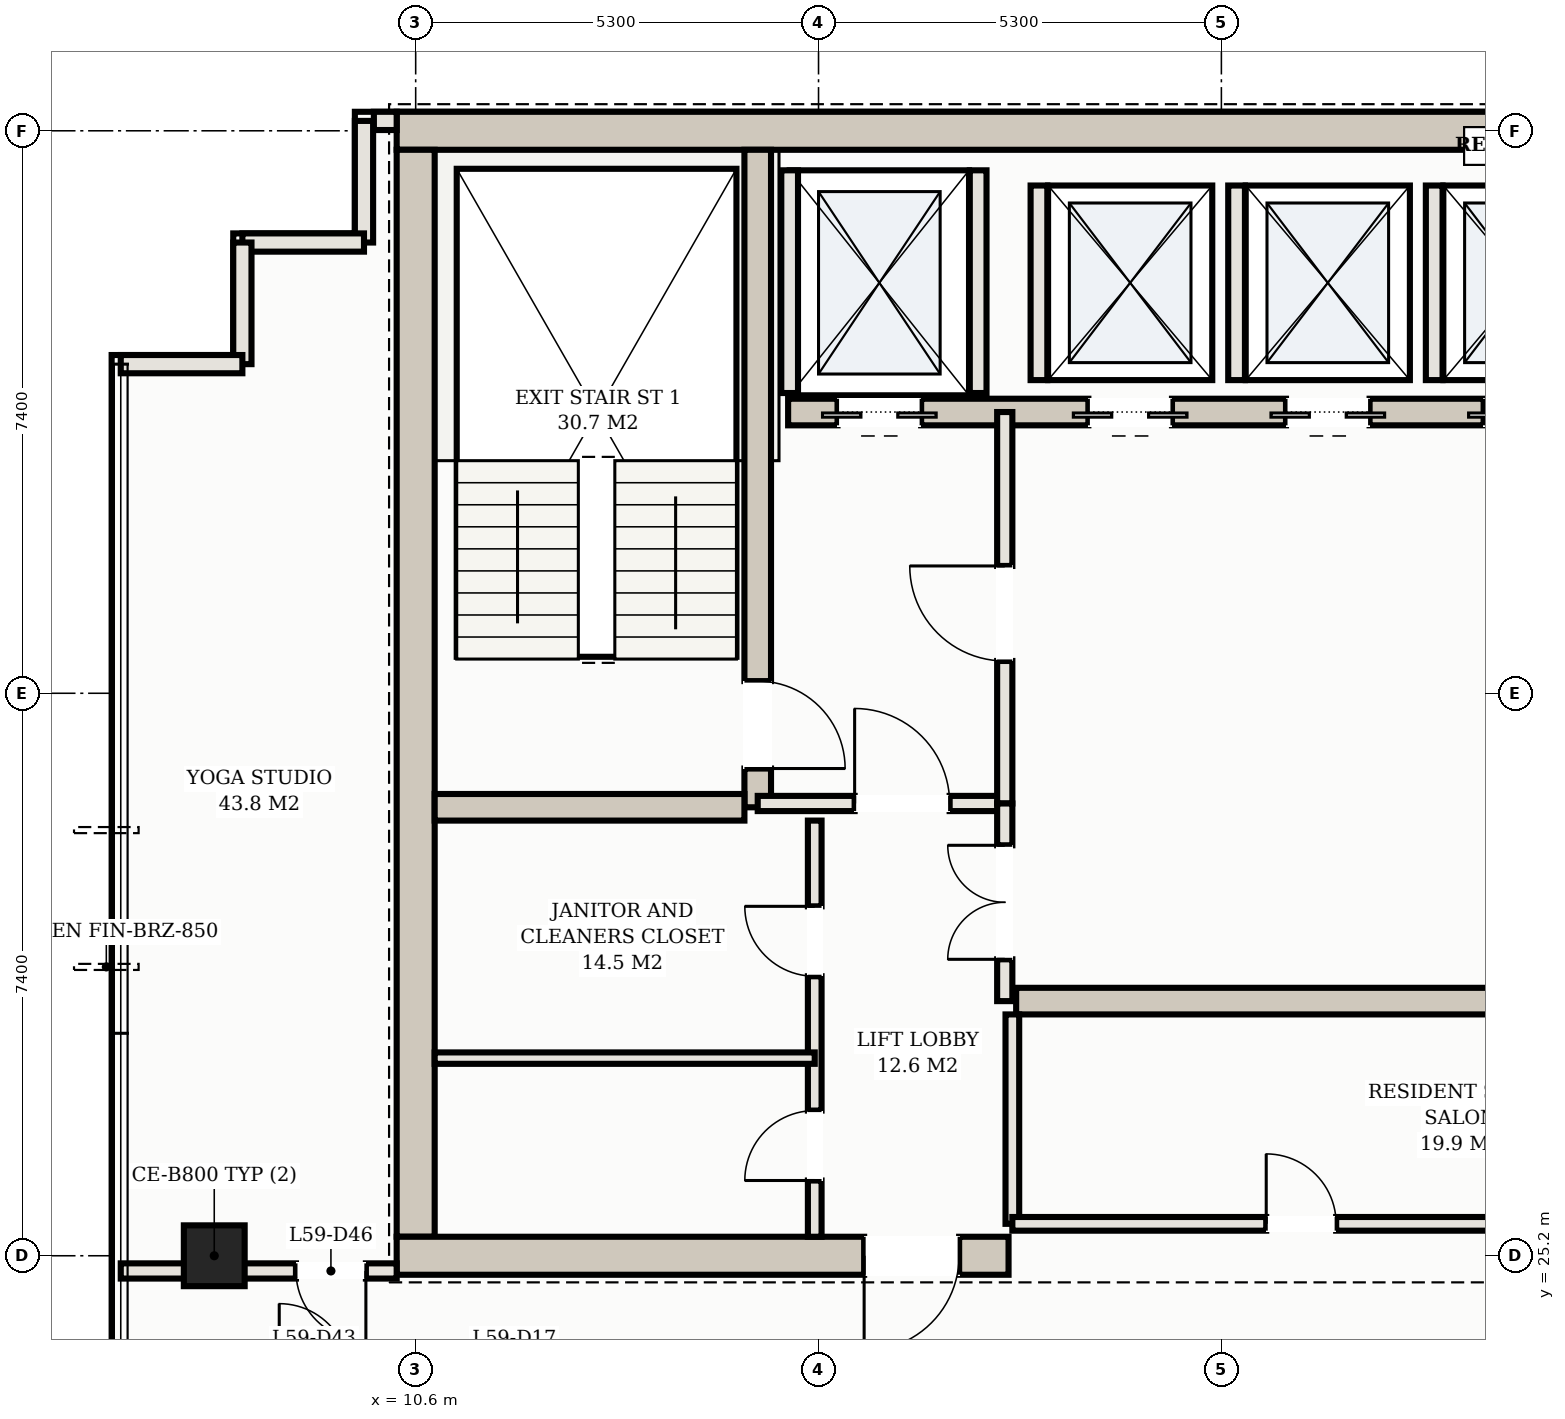
"""IFC4 building model, lengths in metres.
Left out: names, types, materials, properties, quantities, classifications, styles, units other than length and angle.
Written with IfcOpenShell. Run it as: python <this file> out.ifc"""

import sys

from ifc_helpers import new_model, si_unit, direction, frame, frame_2d, origin, origin_2d, place, context, subcontext, project, spatial, rectangle, hollow_rectangle, extrude, element, fill, save


model = new_model("IFC4")
c1 = context("Model", 3, precision=1e-05, world=origin(), true_north=direction((0.0, 1.0)))
c2 = subcontext(c1, "Body", "Model", "MODEL_VIEW")
j1 = project(units=[si_unit("LENGTHUNIT", "METRE"), si_unit("PLANEANGLEUNIT", "RADIAN")], contexts=[c1])
p1 = place(None, origin())
s1 = spatial("IfcSite", under=j1, at=p1, CompositionType="ELEMENT")
p2 = place(p1, origin())
s2 = spatial("IfcBuilding", under=s1, at=p2, CompositionType="ELEMENT")
p3 = place(p2, frame((0.0, 0.0, 216.5)))
s3 = spatial("IfcBuildingStorey", under=s2, at=p3, CompositionType="ELEMENT", Elevation=216.5)
p4 = place(p3, frame((10.35, 40.0, 0.0), z_axis=(0.0, 0.0, 1.0), x_axis=(1.0, 0.0, 0.0)))
e1 = element("IfcWall", 1, at=p4, inside=s3, PredefinedType="SHEAR", context=c2, shape_type="SweptSolid", body=[
    extrude(rectangle(XDim=32.3, YDim=0.5, at=frame_2d((16.15, 0.0))), origin(), (0.0, 0.0, 1.0), 3.11),
])
p5 = place(p3, frame((10.6, 25.45, 0.0), z_axis=(0.0, 0.0, 1.0), x_axis=(0.0, 1.0, 0.0)))
e2 = element("IfcWall", 2, at=p5, inside=s3, PredefinedType="SHEAR", context=c2, shape_type="SweptSolid", body=[
    extrude(rectangle(XDim=14.3, YDim=0.5, at=frame_2d((7.15, 0.0))), origin(), (0.0, 0.0, 1.0), 3.11),
])
p6 = place(p3, frame((10.35, 25.2, 0.0), z_axis=(0.0, 0.0, 1.0), x_axis=(1.0, 0.0, 0.0)))
e3 = element("IfcWall", 3, at=p6, inside=s3, PredefinedType="SHEAR", context=c2, shape_type="SweptSolid", body=[
    extrude(rectangle(XDim=8.05, YDim=0.5, at=frame_2d((4.025, 0.0))), origin(), (0.0, 0.0, 1.0), 3.11),
])
p7 = place(p6, frame((6.15, 0.0, 0.0)))
e4 = element("IfcOpeningElement", 4, at=p7, cuts=e3, PredefinedType="OPENING", context=c2, shape_type="SweptSolid", body=[
    extrude(rectangle(XDim=1.25, YDim=2.2, at=frame_2d((0.625, 1.1))), frame((0.0, 0.26, 0.0), z_axis=(0.0, -1.0, 0.0), x_axis=(1.0, 0.0, 0.0)), (0.0, 0.0, 1.0), 0.52),
])
p8 = place(p3, frame((15.1, 31.1, 0.0), z_axis=(0.0, 0.0, 1.0), x_axis=(0.0, 1.0, 0.0)))
e5 = element("IfcWall", 5, at=p8, inside=s3, PredefinedType="SHEAR", context=c2, shape_type="SweptSolid", body=[
    extrude(rectangle(XDim=8.65, YDim=0.35, at=frame_2d((4.325, 0.0))), origin(), (0.0, 0.0, 1.0), 3.11),
])
p9 = place(p8, frame((0.51, 0.0, 0.0)))
e6 = element("IfcOpeningElement", 6, at=p9, cuts=e5, PredefinedType="OPENING", context=c2, shape_type="SweptSolid", body=[
    extrude(rectangle(XDim=1.15, YDim=2.2, at=frame_2d((0.575, 1.1))), frame((0.0, 0.185, 0.0), z_axis=(0.0, -1.0, 0.0), x_axis=(1.0, 0.0, 0.0)), (0.0, 0.0, 1.0), 0.37),
])
p10 = place(p3, frame((10.85, 31.1, 0.0), z_axis=(0.0, 0.0, 1.0), x_axis=(1.0, 0.0, 0.0)))
e7 = element("IfcWall", 7, at=p10, inside=s3, PredefinedType="SHEAR", context=c2, shape_type="SweptSolid", body=[
    extrude(rectangle(XDim=4.075, YDim=0.35, at=frame_2d((2.038, 0.0))), origin(), (0.0, 0.0, 1.0), 3.11),
])
p11 = place(p3, frame((15.5, 36.3, 0.0), z_axis=(0.0, 0.0, 1.0), x_axis=(1.0, 0.0, 0.0)))
e8 = element("IfcWall", 8, at=p11, inside=s3, PredefinedType="SHEAR", context=c2, shape_type="SweptSolid", body=[
    extrude(rectangle(XDim=22.0, YDim=0.35, at=frame_2d((11.0, 0.0))), origin(), (0.0, 0.0, 1.0), 3.11),
])
p12 = place(p11, frame((0.65, 0.0, 0.0)))
e9 = element("IfcOpeningElement", 9, at=p12, cuts=e8, PredefinedType="OPENING", context=c2, shape_type="SweptSolid", body=[
    extrude(rectangle(XDim=1.1, YDim=2.15, at=frame_2d((0.55, 1.075))), frame((0.0, 0.185, 0.0), z_axis=(0.0, -1.0, 0.0), x_axis=(1.0, 0.0, 0.0)), (0.0, 0.0, 1.0), 0.37),
])
p13 = place(p11, frame((20.25, 0.0, 0.0)))
e10 = element("IfcOpeningElement", 10, at=p13, cuts=e8, PredefinedType="OPENING", context=c2, shape_type="SweptSolid", body=[
    extrude(rectangle(XDim=1.1, YDim=2.15, at=frame_2d((0.55, 1.075))), frame((0.0, 0.185, 0.0), z_axis=(0.0, -1.0, 0.0), x_axis=(1.0, 0.0, 0.0)), (0.0, 0.0, 1.0), 0.37),
])
p14 = place(p11, frame((17.05, 0.0, 0.0)))
e11 = element("IfcOpeningElement", 11, at=p14, cuts=e8, PredefinedType="OPENING", context=c2, shape_type="SweptSolid", body=[
    extrude(rectangle(XDim=1.3, YDim=2.2, at=frame_2d((0.65, 1.1))), frame((0.0, 0.185, 0.0), z_axis=(0.0, -1.0, 0.0), x_axis=(1.0, 0.0, 0.0)), (0.0, 0.0, 1.0), 0.37),
])
p15 = place(p11, frame((3.95, 0.0, 0.0)))
e12 = element("IfcOpeningElement", 12, at=p15, cuts=e8, PredefinedType="OPENING", context=c2, shape_type="SweptSolid", body=[
    extrude(rectangle(XDim=1.1, YDim=2.15, at=frame_2d((0.55, 1.075))), frame((0.0, 0.185, 0.0), z_axis=(0.0, -1.0, 0.0), x_axis=(1.0, 0.0, 0.0)), (0.0, 0.0, 1.0), 0.37),
])
p16 = place(p11, frame((6.55, 0.0, 0.0)))
e13 = element("IfcOpeningElement", 13, at=p16, cuts=e8, PredefinedType="OPENING", context=c2, shape_type="SweptSolid", body=[
    extrude(rectangle(XDim=1.1, YDim=2.15, at=frame_2d((0.55, 1.075))), frame((0.0, 0.185, 0.0), z_axis=(0.0, -1.0, 0.0), x_axis=(1.0, 0.0, 0.0)), (0.0, 0.0, 1.0), 0.37),
])
p17 = place(p11, frame((9.15, 0.0, 0.0)))
e14 = element("IfcOpeningElement", 14, at=p17, cuts=e8, PredefinedType="OPENING", context=c2, shape_type="SweptSolid", body=[
    extrude(rectangle(XDim=1.1, YDim=2.15, at=frame_2d((0.55, 1.075))), frame((0.0, 0.185, 0.0), z_axis=(0.0, -1.0, 0.0), x_axis=(1.0, 0.0, 0.0)), (0.0, 0.0, 1.0), 0.37),
])
p18 = place(p3, frame((18.5, 28.55, 0.0), z_axis=(0.0, 0.0, 1.0), x_axis=(1.0, 0.0, 0.0)))
e15 = element("IfcWall", 15, at=p18, inside=s3, PredefinedType="SHEAR", context=c2, shape_type="SweptSolid", body=[
    extrude(rectangle(XDim=16.0, YDim=0.35, at=frame_2d((8.0, 0.0))), origin(), (0.0, 0.0, 1.0), 3.11),
])
p19 = place(p3, frame((7.95, 25.2, 0.0), z_axis=(0.0, 0.0, 1.0), x_axis=(1.0, 0.0, 0.0)))
e16 = element("IfcColumn", 16, at=p19, inside=s3, PredefinedType="COLUMN", context=c2, shape_type="SweptSolid", body=[
    extrude(hollow_rectangle(XDim=0.8, YDim=0.8, WallThickness=0.028, at=origin_2d()), origin(), (0.0, 0.0, 1.0), 3.3),
])
for number, where, z_axis, x_axis in (
    (17, (15.52, 36.55, 0.0), (0.0, 0.0, 1.0), (0.0, 1.0, 0.0)),
    (18, (18.0, 36.55, 0.0), (0.0, 0.0, 1.0), (0.0, 1.0, 0.0)),
):
    element("IfcWall", number, at=place(p3, frame(where, z_axis=z_axis, x_axis=x_axis)), inside=s3, PredefinedType="SOLIDWALL", context=c2, shape_type="SweptSolid", body=[
        extrude(rectangle(XDim=2.93, YDim=0.22, at=frame_2d((1.465, 0.0))), origin(), (0.0, 0.0, 1.0), 3.11),
    ])
for number, where, z_axis, x_axis in (
    (19, (18.8, 36.72, 0.0), (0.0, 0.0, 1.0), (0.0, 1.0, 0.0)),
    (20, (21.4, 36.72, 0.0), (0.0, 0.0, 1.0), (0.0, 1.0, 0.0)),
    (21, (24.0, 36.72, 0.0), (0.0, 0.0, 1.0), (0.0, 1.0, 0.0)),
):
    element("IfcWall", number, at=place(p3, frame(where, z_axis=z_axis, x_axis=x_axis)), inside=s3, PredefinedType="SOLIDWALL", context=c2, shape_type="SweptSolid", body=[
        extrude(rectangle(XDim=2.56, YDim=0.22, at=frame_2d((1.28, 0.0))), origin(), (0.0, 0.0, 1.0), 3.11),
    ])
p20 = place(p3, frame((10.35, 40.13, 0.0), z_axis=(0.0, 0.0, 1.0), x_axis=(-1.0, 0.0, 0.0)))
e22 = element("IfcWall", 22, at=p20, inside=s3, PredefinedType="SOLIDWALL", context=c2, shape_type="SweptSolid", body=[
    extrude(rectangle(XDim=0.3, YDim=0.24, at=frame_2d((0.15, 0.0))), origin(), (0.0, 0.0, 1.0), 3.11),
])
for number, where, z_axis, x_axis in (
    (23, (9.92, 40.13, 0.0), (0.0, 0.0, 1.0), (0.0, -1.0, 0.0)),
    (24, (9.92, 38.53, 0.0), (0.0, 0.0, 1.0), (-1.0, 0.0, 0.0)),
):
    element("IfcWall", number, at=place(p3, frame(where, z_axis=z_axis, x_axis=x_axis)), inside=s3, PredefinedType="SOLIDWALL", context=c2, shape_type="SweptSolid", body=[
        extrude(rectangle(XDim=1.6, YDim=0.24, at=frame_2d((0.8, 0.0))), origin(), (0.0, 0.0, 1.0), 3.11),
    ])
for number, where, z_axis, x_axis in (
    (25, (8.32, 38.53, 0.0), (0.0, 0.0, 1.0), (0.0, -1.0, 0.0)),
    (26, (8.32, 36.93, 0.0), (0.0, 0.0, 1.0), (-1.0, 0.0, 0.0)),
):
    element("IfcWall", number, at=place(p3, frame(where, z_axis=z_axis, x_axis=x_axis)), inside=s3, PredefinedType="SOLIDWALL", context=c2, shape_type="SweptSolid", body=[
        extrude(rectangle(XDim=1.6, YDim=0.24, at=frame_2d((0.8, 0.0))), origin(), (0.0, 0.0, 1.0), 3.11),
    ])
p21 = place(p3, frame((15.1, 31.15, 0.0), z_axis=(0.0, 0.0, 1.0), x_axis=(1.0, 0.0, 0.0)))
e27 = element("IfcWall", 27, at=p21, inside=s3, PredefinedType="PARTITIONING", context=c2, shape_type="SweptSolid", body=[
    extrude(rectangle(XDim=3.25, YDim=0.2, at=frame_2d((1.625, 0.0))), origin(), (0.0, 0.0, 1.0), 2.43),
])
p22 = place(p21, frame((1.275, 0.0, 0.0)))
e28 = element("IfcOpeningElement", 28, at=p22, cuts=e27, PredefinedType="OPENING", context=c2, shape_type="SweptSolid", body=[
    extrude(rectangle(XDim=1.25, YDim=2.2, at=frame_2d((0.625, 1.1))), frame((0.0, 0.11, 0.0), z_axis=(0.0, -1.0, 0.0), x_axis=(1.0, 0.0, 0.0)), (0.0, 0.0, 1.0), 0.22),
])
p23 = place(p3, frame((18.35, 31.15, 0.0), z_axis=(0.0, 0.0, 1.0), x_axis=(0.0, 1.0, 0.0)))
e29 = element("IfcWall", 29, at=p23, inside=s3, PredefinedType="PARTITIONING", context=c2, shape_type="SweptSolid", body=[
    extrude(rectangle(XDim=5.15, YDim=0.2, at=frame_2d((2.575, 0.0))), origin(), (0.0, 0.0, 1.0), 2.43),
])
p24 = place(p23, frame((1.875, 0.0, 0.0)))
e30 = element("IfcOpeningElement", 30, at=p24, cuts=e29, PredefinedType="OPENING", context=c2, shape_type="SweptSolid", body=[
    extrude(rectangle(XDim=1.25, YDim=2.2, at=frame_2d((0.625, 1.1))), frame((0.0, 0.11, 0.0), z_axis=(0.0, -1.0, 0.0), x_axis=(1.0, 0.0, 0.0)), (0.0, 0.0, 1.0), 0.22),
])
p25 = place(p3, frame((15.85, 25.45, 0.0), z_axis=(0.0, 0.0, 1.0), x_axis=(0.0, 1.0, 0.0)))
e31 = element("IfcWall", 31, at=p25, inside=s3, PredefinedType="PARTITIONING", context=c2, shape_type="SweptSolid", body=[
    extrude(rectangle(XDim=5.475, YDim=0.18, at=frame_2d((2.738, 0.0))), origin(), (0.0, 0.0, 1.0), 2.43),
])
p26 = place(p25, frame((0.74, 0.0, 0.0)))
e32 = element("IfcOpeningElement", 32, at=p26, cuts=e31, PredefinedType="OPENING", context=c2, shape_type="SweptSolid", body=[
    extrude(rectangle(XDim=0.92, YDim=2.15, at=frame_2d((0.46, 1.075))), frame((0.0, 0.1, 0.0), z_axis=(0.0, -1.0, 0.0), x_axis=(1.0, 0.0, 0.0)), (0.0, 0.0, 1.0), 0.2),
])
p27 = place(p25, frame((3.427, 0.0, 0.0)))
e33 = element("IfcOpeningElement", 33, at=p27, cuts=e31, PredefinedType="OPENING", context=c2, shape_type="SweptSolid", body=[
    extrude(rectangle(XDim=0.92, YDim=2.15, at=frame_2d((0.46, 1.075))), frame((0.0, 0.1, 0.0), z_axis=(0.0, -1.0, 0.0), x_axis=(1.0, 0.0, 0.0)), (0.0, 0.0, 1.0), 0.2),
])
p28 = place(p3, frame((10.85, 27.8, 0.0), z_axis=(0.0, 0.0, 1.0), x_axis=(1.0, 0.0, 0.0)))
e34 = element("IfcWall", 34, at=p28, inside=s3, PredefinedType="PARTITIONING", context=c2, shape_type="SweptSolid", body=[
    extrude(rectangle(XDim=5.0, YDim=0.15, at=frame_2d((2.5, 0.0))), origin(), (0.0, 0.0, 1.0), 2.43),
])
p29 = place(p3, frame((18.35, 28.55, 0.0), z_axis=(0.0, 0.0, 1.0), x_axis=(0.0, 1.0, 0.0)))
e35 = element("IfcWall", 35, at=p29, inside=s3, PredefinedType="PARTITIONING", context=c2, shape_type="SweptSolid", body=[
    extrude(rectangle(XDim=2.6, YDim=0.2, at=frame_2d((1.3, 0.0))), origin(), (0.0, 0.0, 1.0), 2.43),
])
p30 = place(p29, frame((0.55, 0.0, 0.0)))
e36 = element("IfcOpeningElement", 36, at=p30, cuts=e35, PredefinedType="OPENING", context=c2, shape_type="SweptSolid", body=[
    extrude(rectangle(XDim=1.5, YDim=2.25, at=frame_2d((0.75, 1.125))), frame((0.0, 0.11, 0.0), z_axis=(0.0, -1.0, 0.0), x_axis=(1.0, 0.0, 0.0)), (0.0, 0.0, 1.0), 0.22),
])
p31 = place(p3, frame((18.45, 25.62, 0.0), z_axis=(0.0, 0.0, 1.0), x_axis=(0.0, 1.0, 0.0)))
e37 = element("IfcWall", 37, at=p31, inside=s3, PredefinedType="PARTITIONING", context=c2, shape_type="SweptSolid", body=[
    extrude(rectangle(XDim=2.755, YDim=0.18, at=frame_2d((1.377, 0.0))), origin(), (0.0, 0.0, 1.0), 2.43),
])
p32 = place(p3, frame((18.45, 25.62, 0.0), z_axis=(0.0, 0.0, 1.0), x_axis=(1.0, 0.0, 0.0)))
e38 = element("IfcWall", 38, at=p32, inside=s3, PredefinedType="PARTITIONING", context=c2, shape_type="SweptSolid", body=[
    extrude(rectangle(XDim=7.9, YDim=0.18, at=frame_2d((3.95, 0.0))), origin(), (0.0, 0.0, 1.0), 2.43),
])
p33 = place(p32, frame((3.34, 0.0, 0.0)))
e39 = element("IfcOpeningElement", 39, at=p33, cuts=e38, PredefinedType="OPENING", context=c2, shape_type="SweptSolid", body=[
    extrude(rectangle(XDim=0.92, YDim=2.15, at=frame_2d((0.46, 1.075))), frame((0.0, 0.1, 0.0), z_axis=(0.0, -1.0, 0.0), x_axis=(1.0, 0.0, 0.0)), (0.0, 0.0, 1.0), 0.2),
])
p34 = place(p3, frame((6.72, 25.0, 0.0), z_axis=(0.0, 0.0, 1.0), x_axis=(1.0, 0.0, 0.0)))
e40 = element("IfcWall", 40, at=p34, inside=s3, PredefinedType="PARTITIONING", context=c2, shape_type="SweptSolid", body=[
    extrude(rectangle(XDim=3.63, YDim=0.2, at=frame_2d((1.815, 0.0))), origin(), (0.0, 0.0, 1.0), 2.43),
])
p35 = place(p34, frame((2.305, 0.0, 0.0)))
e41 = element("IfcOpeningElement", 41, at=p35, cuts=e40, PredefinedType="OPENING", context=c2, shape_type="SweptSolid", body=[
    extrude(rectangle(XDim=0.92, YDim=2.15, at=frame_2d((0.46, 1.075))), frame((0.0, 0.11, 0.0), z_axis=(0.0, -1.0, 0.0), x_axis=(1.0, 0.0, 0.0)), (0.0, 0.0, 1.0), 0.22),
])
p36 = place(p12, frame((1.1, 0.0, 0.0), z_axis=(0.0, 0.0, 1.0), x_axis=(-1.0, 0.0, 0.0)))
e42 = element("IfcDoor", 42, at=p36, inside=s3, OperationType="DOUBLE_DOOR_SLIDING", PredefinedType="DOOR", context=c2, shape_type="SweptSolid", body=[
    extrude(rectangle(XDim=1.1, YDim=2.15, at=frame_2d((0.55, 1.075))), frame((0.0, 0.025, 0.0), z_axis=(0.0, -1.0, 0.0), x_axis=(1.0, 0.0, 0.0)), (0.0, 0.0, 1.0), 0.05),
])
fill(e9, e42)
p37 = place(p15, frame((1.1, 0.0, 0.0), z_axis=(0.0, 0.0, 1.0), x_axis=(-1.0, 0.0, 0.0)))
e43 = element("IfcDoor", 43, at=p37, inside=s3, OperationType="DOUBLE_DOOR_SLIDING", PredefinedType="DOOR", context=c2, shape_type="SweptSolid", body=[
    extrude(rectangle(XDim=1.1, YDim=2.15, at=frame_2d((0.55, 1.075))), frame((0.0, 0.025, 0.0), z_axis=(0.0, -1.0, 0.0), x_axis=(1.0, 0.0, 0.0)), (0.0, 0.0, 1.0), 0.05),
])
fill(e12, e43)
p38 = place(p16, frame((1.1, 0.0, 0.0), z_axis=(0.0, 0.0, 1.0), x_axis=(-1.0, 0.0, 0.0)))
e44 = element("IfcDoor", 44, at=p38, inside=s3, OperationType="DOUBLE_DOOR_SLIDING", PredefinedType="DOOR", context=c2, shape_type="SweptSolid", body=[
    extrude(rectangle(XDim=1.1, YDim=2.15, at=frame_2d((0.55, 1.075))), frame((0.0, 0.025, 0.0), z_axis=(0.0, -1.0, 0.0), x_axis=(1.0, 0.0, 0.0)), (0.0, 0.0, 1.0), 0.05),
])
fill(e13, e44)
p39 = place(p17, frame((1.1, 0.0, 0.0), z_axis=(0.0, 0.0, 1.0), x_axis=(-1.0, 0.0, 0.0)))
e45 = element("IfcDoor", 45, at=p39, inside=s3, OperationType="DOUBLE_DOOR_SLIDING", PredefinedType="DOOR", context=c2, shape_type="SweptSolid", body=[
    extrude(rectangle(XDim=1.1, YDim=2.15, at=frame_2d((0.55, 1.075))), frame((0.0, 0.025, 0.0), z_axis=(0.0, -1.0, 0.0), x_axis=(1.0, 0.0, 0.0)), (0.0, 0.0, 1.0), 0.05),
])
fill(e14, e45)
p40 = place(p7, frame((1.25, 0.0, 0.0), z_axis=(0.0, 0.0, 1.0), x_axis=(-1.0, 0.0, 0.0)))
e46 = element("IfcDoor", 46, at=p40, inside=s3, OperationType="SINGLE_SWING_RIGHT", PredefinedType="DOOR", context=c2, shape_type="SweptSolid", body=[
    extrude(rectangle(XDim=1.25, YDim=2.2, at=frame_2d((0.625, 1.1))), frame((0.0, 0.025, 0.0), z_axis=(0.0, -1.0, 0.0), x_axis=(1.0, 0.0, 0.0)), (0.0, 0.0, 1.0), 0.05),
])
fill(e4, e46)
p41 = place(p22, origin())
e47 = element("IfcDoor", 47, at=p41, inside=s3, OperationType="SINGLE_SWING_LEFT", PredefinedType="DOOR", context=c2, shape_type="SweptSolid", body=[
    extrude(rectangle(XDim=1.25, YDim=2.2, at=frame_2d((0.625, 1.1))), frame((0.0, 0.025, 0.0), z_axis=(0.0, -1.0, 0.0), x_axis=(1.0, 0.0, 0.0)), (0.0, 0.0, 1.0), 0.05),
])
fill(e28, e47)
p42 = place(p24, origin())
e48 = element("IfcDoor", 48, at=p42, inside=s3, OperationType="SINGLE_SWING_RIGHT", PredefinedType="DOOR", context=c2, shape_type="SweptSolid", body=[
    extrude(rectangle(XDim=1.25, YDim=2.2, at=frame_2d((0.625, 1.1))), frame((0.0, 0.025, 0.0), z_axis=(0.0, -1.0, 0.0), x_axis=(1.0, 0.0, 0.0)), (0.0, 0.0, 1.0), 0.05),
])
fill(e30, e48)
p43 = place(p9, frame((1.15, 0.0, 0.0), z_axis=(0.0, 0.0, 1.0), x_axis=(-1.0, 0.0, 0.0)))
e49 = element("IfcDoor", 49, at=p43, inside=s3, OperationType="SINGLE_SWING_RIGHT", PredefinedType="DOOR", context=c2, shape_type="SweptSolid", body=[
    extrude(rectangle(XDim=1.15, YDim=2.2, at=frame_2d((0.575, 1.1))), frame((0.0, 0.025, 0.0), z_axis=(0.0, -1.0, 0.0), x_axis=(1.0, 0.0, 0.0)), (0.0, 0.0, 1.0), 0.05),
])
fill(e6, e49)
p44 = place(p26, origin())
e50 = element("IfcDoor", 50, at=p44, inside=s3, OperationType="SINGLE_SWING_LEFT", PredefinedType="DOOR", context=c2, shape_type="SweptSolid", body=[
    extrude(rectangle(XDim=0.92, YDim=2.15, at=frame_2d((0.46, 1.075))), frame((0.0, 0.025, 0.0), z_axis=(0.0, -1.0, 0.0), x_axis=(1.0, 0.0, 0.0)), (0.0, 0.0, 1.0), 0.05),
])
fill(e32, e50)
p45 = place(p27, origin())
e51 = element("IfcDoor", 51, at=p45, inside=s3, OperationType="SINGLE_SWING_RIGHT", PredefinedType="DOOR", context=c2, shape_type="SweptSolid", body=[
    extrude(rectangle(XDim=0.92, YDim=2.15, at=frame_2d((0.46, 1.075))), frame((0.0, 0.025, 0.0), z_axis=(0.0, -1.0, 0.0), x_axis=(1.0, 0.0, 0.0)), (0.0, 0.0, 1.0), 0.05),
])
fill(e33, e51)
p46 = place(p30, origin())
e52 = element("IfcDoor", 52, at=p46, inside=s3, OperationType="DOUBLE_DOOR_SINGLE_SWING", PredefinedType="DOOR", context=c2, shape_type="SweptSolid", body=[
    extrude(rectangle(XDim=1.5, YDim=2.25, at=frame_2d((0.75, 1.125))), frame((0.0, 0.025, 0.0), z_axis=(0.0, -1.0, 0.0), x_axis=(1.0, 0.0, 0.0)), (0.0, 0.0, 1.0), 0.05),
])
fill(e36, e52)
p47 = place(p33, origin())
e53 = element("IfcDoor", 53, at=p47, inside=s3, OperationType="SINGLE_SWING_LEFT", PredefinedType="DOOR", context=c2, shape_type="SweptSolid", body=[
    extrude(rectangle(XDim=0.92, YDim=2.15, at=frame_2d((0.46, 1.075))), frame((0.0, 0.025, 0.0), z_axis=(0.0, -1.0, 0.0), x_axis=(1.0, 0.0, 0.0)), (0.0, 0.0, 1.0), 0.05),
])
fill(e39, e53)
p48 = place(p35, frame((0.92, 0.0, 0.0), z_axis=(0.0, 0.0, 1.0), x_axis=(-1.0, 0.0, 0.0)))
e54 = element("IfcDoor", 54, at=p48, inside=s3, OperationType="SINGLE_SWING_LEFT", PredefinedType="DOOR", context=c2, shape_type="SweptSolid", body=[
    extrude(rectangle(XDim=0.92, YDim=2.15, at=frame_2d((0.46, 1.075))), frame((0.0, 0.025, 0.0), z_axis=(0.0, -1.0, 0.0), x_axis=(1.0, 0.0, 0.0)), (0.0, 0.0, 1.0), 0.05),
])
fill(e41, e54)
save(model, sys.argv[1])
